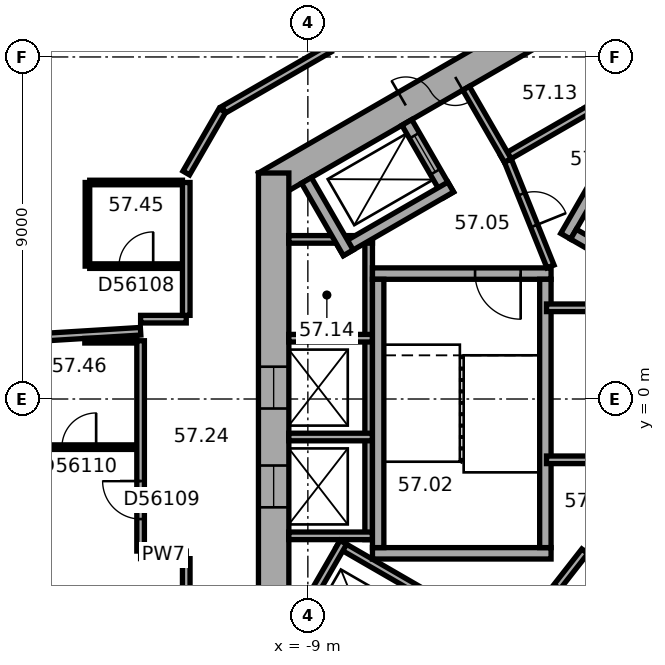
"""IFC4 building model, lengths in metres.
Left out: names, types, materials, properties, quantities, classifications, styles, units other than length and angle.
Written with IfcOpenShell. Run it as: python <this file> out.ifc"""

import sys

from ifc_helpers import new_model, si_unit, direction, frame, frame_2d, origin, place, context, subcontext, project, spatial, rectangle, extrude, element, fill, save


model = new_model("IFC4")
c1 = context("Model", 3, precision=1e-05, world=origin(), true_north=direction((0.0, 1.0)))
c2 = subcontext(c1, "Body", "Model", "MODEL_VIEW")
j1 = project(units=[si_unit("LENGTHUNIT", "METRE"), si_unit("PLANEANGLEUNIT", "RADIAN")], contexts=[c1])
p1 = place(None, origin())
s1 = spatial("IfcSite", under=j1, at=p1, CompositionType="ELEMENT")
p2 = place(p1, origin())
s2 = spatial("IfcBuilding", under=s1, at=p2, CompositionType="ELEMENT")
p3 = place(p2, frame((0.0, 0.0, 232.8)))
s3 = spatial("IfcBuildingStorey", under=s2, at=p3, CompositionType="ELEMENT", Elevation=232.8)
p4 = place(p3, frame((0.2, 11.547, 0.0), z_axis=(0.0, 0.0, 1.0), x_axis=(-0.866023897231, -0.500002609418, 0.0)))
e1 = element("IfcWall", 1, at=p4, inside=s3, PredefinedType="SHEAR", context=c2, shape_type="SweptSolid", body=[
    extrude(rectangle(XDim=11.894, YDim=0.8, at=frame_2d((5.947, 0.0))), origin(), (0.0, 0.0, 1.0), 3.7),
])
p5 = place(p4, frame((6.147, 0.0, 0.0)))
e2 = element("IfcOpeningElement", 2, at=p5, cuts=e1, PredefinedType="OPENING", context=c2, shape_type="SweptSolid", body=[
    extrude(rectangle(XDim=1.5, YDim=2.1, at=frame_2d((0.75, 1.05))), frame((0.0, 0.41, 0.0), z_axis=(0.0, -1.0, 0.0), x_axis=(1.0, 0.0, 0.0)), (0.0, 0.0, 1.0), 0.82),
])
p6 = place(p4, frame((2.997, 0.0, 0.0)))
e3 = element("IfcOpeningElement", 3, at=p6, cuts=e1, PredefinedType="OPENING", context=c2, shape_type="SweptSolid", body=[
    extrude(rectangle(XDim=0.9, YDim=2.1, at=frame_2d((0.45, 1.05))), frame((0.0, 0.41, 0.0), z_axis=(0.0, -1.0, 0.0), x_axis=(1.0, 0.0, 0.0)), (0.0, 0.0, 1.0), 0.82),
])
p7 = place(p3, frame((-9.9, 5.947, 0.0), z_axis=(0.0, 0.0, 1.0), x_axis=(0.0, -1.0, 0.0)))
e4 = element("IfcWall", 4, at=p7, inside=s3, PredefinedType="SHEAR", context=c2, shape_type="SweptSolid", body=[
    extrude(rectangle(XDim=11.894, YDim=0.8, at=frame_2d((5.947, 0.0))), origin(), (0.0, 0.0, 1.0), 3.7),
])
p8 = place(p7, frame((5.097, 0.0, 0.0)))
e5 = element("IfcOpeningElement", 5, at=p8, cuts=e4, PredefinedType="OPENING", context=c2, shape_type="SweptSolid", body=[
    extrude(rectangle(XDim=1.1, YDim=2.1, at=frame_2d((0.55, 1.05))), frame((0.0, 0.41, 0.0), z_axis=(0.0, -1.0, 0.0), x_axis=(1.0, 0.0, 0.0)), (0.0, 0.0, 1.0), 0.82),
])
p9 = place(p7, frame((7.697, 0.0, 0.0)))
e6 = element("IfcOpeningElement", 6, at=p9, cuts=e4, PredefinedType="OPENING", context=c2, shape_type="SweptSolid", body=[
    extrude(rectangle(XDim=1.1, YDim=2.1, at=frame_2d((0.55, 1.05))), frame((0.0, 0.41, 0.0), z_axis=(0.0, -1.0, 0.0), x_axis=(1.0, 0.0, 0.0)), (0.0, 0.0, 1.0), 0.82),
])
p10 = place(p3, frame((0.803, 9.009, 0.0), z_axis=(0.0, 0.0, 1.0), x_axis=(-0.866028230842, -0.499995103361, 0.0)))
e7 = element("IfcWall", 7, at=p10, inside=s3, PredefinedType="PARTITIONING", context=c2, shape_type="SweptSolid", body=[
    extrude(rectangle(XDim=5.4, YDim=0.2, at=frame_2d((2.7, 0.0))), origin(), (0.0, 0.0, 1.0), 3.42),
])
p11 = place(p3, frame((-3.737, 6.272, 0.0), z_axis=(0.0, 0.0, 1.0), x_axis=(-0.50002983664, 0.866008176907, 0.0)))
e8 = element("IfcWall", 8, at=p11, inside=s3, PredefinedType="PARTITIONING", context=c2, shape_type="SweptSolid", body=[
    extrude(rectangle(XDim=2.2, YDim=0.2, at=frame_2d((1.1, 0.0))), origin(), (0.0, 0.0, 1.0), 3.42),
])
p12 = place(p3, frame((-7.4, 4.3, 0.0), z_axis=(0.0, 0.0, 1.0), x_axis=(0.0, -1.0, 0.0)))
e9 = element("IfcWall", 9, at=p12, inside=s3, PredefinedType="PARTITIONING", context=c2, shape_type="SweptSolid", body=[
    extrude(rectangle(XDim=8.0, YDim=0.2, at=frame_2d((4.0, 0.0))), origin(), (0.0, 0.0, 1.0), 3.42),
])
for number, where, z_axis, x_axis in (
    (10, (-7.3, 4.2, 0.0), (0.0, 0.0, 1.0), (-1.0, 0.0, 0.0)),
    (11, (-7.3, 1.6, 0.0), (0.0, 0.0, 1.0), (-1.0, 0.0, 0.0)),
    (12, (-7.3, -1.0, 0.0), (0.0, 0.0, 1.0), (-1.0, 0.0, 0.0)),
    (13, (-7.3, -3.6, 0.0), (0.0, 0.0, 1.0), (-1.0, 0.0, 0.0)),
):
    element("IfcWall", number, at=place(p3, frame(where, z_axis=z_axis, x_axis=x_axis)), inside=s3, PredefinedType="PARTITIONING", context=c2, shape_type="SweptSolid", body=[
        extrude(rectangle(XDim=2.2, YDim=0.2, at=frame_2d((1.1, 0.0))), origin(), (0.0, 0.0, 1.0), 3.42),
    ])
p13 = place(p3, frame((-8.203, -3.809, 0.0), z_axis=(0.0, 0.0, 1.0), x_axis=(0.866028230842, -0.499995103361, 0.0)))
e14 = element("IfcWall", 14, at=p13, inside=s3, PredefinedType="PARTITIONING", context=c2, shape_type="SweptSolid", body=[
    extrude(rectangle(XDim=5.4, YDim=0.2, at=frame_2d((2.7, 0.0))), origin(), (0.0, 0.0, 1.0), 3.42),
])
p14 = place(p3, frame((-8.067, -3.772, 0.0), z_axis=(0.0, 0.0, 1.0), x_axis=(-0.50002983664, -0.866008176907, 0.0)))
e15 = element("IfcWall", 15, at=p14, inside=s3, PredefinedType="PARTITIONING", context=c2, shape_type="SweptSolid", body=[
    extrude(rectangle(XDim=2.2, YDim=0.2, at=frame_2d((1.1, 0.0))), origin(), (0.0, 0.0, 1.0), 3.42),
])
p15 = place(p3, frame((-2.216, 4.282, 0.0), z_axis=(0.0, 0.0, 1.0), x_axis=(0.499977259774, 0.866038532462, 0.0)))
e16 = element("IfcWall", 16, at=p15, inside=s3, PredefinedType="SHEAR", context=c2, shape_type="SweptSolid", body=[
    extrude(rectangle(XDim=4.7, YDim=0.3, at=frame_2d((2.35, 0.0))), origin(), (0.0, 0.0, 1.0), 3.42),
])
p16 = place(p3, frame((4.103, 0.807, 0.0), z_axis=(0.0, 0.0, 1.0), x_axis=(-0.866027801685, 0.499995846692, 0.0)))
e17 = element("IfcWall", 17, at=p16, inside=s3, PredefinedType="SHEAR", context=c2, shape_type="SweptSolid", body=[
    extrude(rectangle(XDim=7.06, YDim=0.3, at=frame_2d((3.53, 0.0))), origin(), (0.0, 0.0, 1.0), 3.42),
])
p17 = place(p3, frame((-2.6, 3.3, 0.0), z_axis=(0.0, 0.0, 1.0), x_axis=(-1.0, 0.0, 0.0)))
e18 = element("IfcWall", 18, at=p17, inside=s3, PredefinedType="SHEAR", context=c2, shape_type="SweptSolid", body=[
    extrude(rectangle(XDim=4.7, YDim=0.3, at=frame_2d((2.35, 0.0))), origin(), (0.0, 0.0, 1.0), 3.42),
])
p18 = place(p17, frame((0.8, 0.0, 0.0)))
e19 = element("IfcOpeningElement", 19, at=p18, cuts=e18, PredefinedType="OPENING", context=c2, shape_type="SweptSolid", body=[
    extrude(rectangle(XDim=1.2, YDim=2.1, at=frame_2d((0.6, 1.05))), frame((0.0, 0.16, 0.0), z_axis=(0.0, -1.0, 0.0), x_axis=(1.0, 0.0, 0.0)), (0.0, 0.0, 1.0), 0.32),
])
p19 = place(p3, frame((-2.6, -4.06, 0.0), z_axis=(0.0, 0.0, 1.0), x_axis=(-1.0, 0.0, 0.0)))
e20 = element("IfcWall", 20, at=p19, inside=s3, PredefinedType="SHEAR", context=c2, shape_type="SweptSolid", body=[
    extrude(rectangle(XDim=4.7, YDim=0.3, at=frame_2d((2.35, 0.0))), origin(), (0.0, 0.0, 1.0), 3.42),
])
for number, where, z_axis, x_axis in (
    (21, (-2.75, 3.15, 0.0), (0.0, 0.0, 1.0), (0.0, -1.0, 0.0)),
    (22, (-7.15, 3.15, 0.0), (0.0, 0.0, 1.0), (0.0, -1.0, 0.0)),
):
    element("IfcWall", number, at=place(p3, frame(where, z_axis=z_axis, x_axis=x_axis)), inside=s3, PredefinedType="SHEAR", context=c2, shape_type="SweptSolid", body=[
        extrude(rectangle(XDim=7.06, YDim=0.3, at=frame_2d((3.53, 0.0))), origin(), (0.0, 0.0, 1.0), 3.42),
    ])
p20 = place(p3, frame((-5.295, 5.372, 0.0), z_axis=(0.0, 0.0, 1.0), x_axis=(-0.500077893725, 0.86598042715, 0.0)))
e23 = element("IfcWall", 23, at=p20, inside=s3, PredefinedType="SHEAR", context=c2, shape_type="SweptSolid", body=[
    extrude(rectangle(XDim=2.2, YDim=0.3, at=frame_2d((1.1, 0.0))), origin(), (0.0, 0.0, 1.0), 3.42),
])
p21 = place(p20, frame((0.7, 0.0, 0.0)))
e24 = element("IfcOpeningElement", 24, at=p21, cuts=e23, PredefinedType="OPENING", context=c2, shape_type="SweptSolid", body=[
    extrude(rectangle(XDim=1.1, YDim=2.1, at=frame_2d((0.55, 1.05))), frame((0.0, 0.16, 0.0), z_axis=(0.0, -1.0, 0.0), x_axis=(1.0, 0.0, 0.0)), (0.0, 0.0, 1.0), 0.32),
])
p22 = place(p3, frame((-5.24, 5.577, 0.0), z_axis=(0.0, 0.0, 1.0), x_axis=(-0.866014461049, -0.500018952895, 0.0)))
e25 = element("IfcWall", 25, at=p22, inside=s3, PredefinedType="SHEAR", context=c2, shape_type="SweptSolid", body=[
    extrude(rectangle(XDim=3.35, YDim=0.3, at=frame_2d((1.675, 0.0))), origin(), (0.0, 0.0, 1.0), 3.42),
])
p23 = place(p3, frame((-7.937, 3.847, 0.0), z_axis=(0.0, 0.0, 1.0), x_axis=(-0.50002983664, 0.866008176907, 0.0)))
e26 = element("IfcWall", 26, at=p23, inside=s3, PredefinedType="SHEAR", context=c2, shape_type="SweptSolid", body=[
    extrude(rectangle(XDim=2.2, YDim=0.3, at=frame_2d((1.1, 0.0))), origin(), (0.0, 0.0, 1.0), 3.42),
])
p24 = place(p3, frame((-2.615, 3.487, 0.0), z_axis=(0.0, 0.0, 1.0), x_axis=(-0.373576831041, 0.92759924068, 0.0)))
e27 = element("IfcWall", 27, at=p24, inside=s3, PredefinedType="PARTITIONING", context=c2, shape_type="SweptSolid", body=[
    extrude(rectangle(XDim=3.002, YDim=0.2, at=frame_2d((1.501, 0.0))), origin(), (0.0, 0.0, 1.0), 3.42),
])
p25 = place(p24, frame((1.15, 0.0, 0.0)))
e28 = element("IfcOpeningElement", 28, at=p25, cuts=e27, PredefinedType="OPENING", context=c2, shape_type="SweptSolid", body=[
    extrude(rectangle(XDim=0.9, YDim=2.1, at=frame_2d((0.45, 1.05))), frame((0.0, 0.11, 0.0), z_axis=(0.0, -1.0, 0.0), x_axis=(1.0, 0.0, 0.0)), (0.0, 0.0, 1.0), 0.22),
])
p26 = place(p3, frame((-1.712, -4.008, 0.0), z_axis=(0.0, 0.0, 1.0), x_axis=(-0.616549420702, -0.787316208287, 0.0)))
e29 = element("IfcWall", 29, at=p26, inside=s3, PredefinedType="PARTITIONING", context=c2, shape_type="SweptSolid", body=[
    extrude(rectangle(XDim=3.002, YDim=0.2, at=frame_2d((1.501, 0.0))), origin(), (0.0, 0.0, 1.0), 3.42),
])
p27 = place(p26, frame((1.15, 0.0, 0.0)))
e30 = element("IfcOpeningElement", 30, at=p27, cuts=e29, PredefinedType="OPENING", context=c2, shape_type="SweptSolid", body=[
    extrude(rectangle(XDim=0.9, YDim=2.1, at=frame_2d((0.45, 1.05))), frame((0.0, 0.11, 0.0), z_axis=(0.0, -1.0, 0.0), x_axis=(1.0, 0.0, 0.0)), (0.0, 0.0, 1.0), 0.22),
])
p28 = place(p3, frame((-2.72, -1.6, 0.0), z_axis=(0.0, 0.0, 1.0), x_axis=(1.0, 0.0, 0.0)))
e31 = element("IfcWall", 31, at=p28, inside=s3, PredefinedType="PARTITIONING", context=c2, shape_type="SweptSolid", body=[
    extrude(rectangle(XDim=5.269, YDim=0.2, at=frame_2d((2.634, 0.0))), origin(), (0.0, 0.0, 1.0), 3.42),
])
p29 = place(p3, frame((-2.72, 2.4, 0.0), z_axis=(0.0, 0.0, 1.0), x_axis=(1.0, 0.0, 0.0)))
e32 = element("IfcWall", 32, at=p29, inside=s3, PredefinedType="PARTITIONING", context=c2, shape_type="SweptSolid", body=[
    extrude(rectangle(XDim=3.883, YDim=0.2, at=frame_2d((1.941, 0.0))), origin(), (0.0, 0.0, 1.0), 3.42),
])
p30 = place(p3, frame((-19.672, 1.4, 0.0), z_axis=(0.0, 0.0, 1.0), x_axis=(0.99813499784, 0.061045278997, 0.0)))
e33 = element("IfcWall", 33, at=p30, inside=s3, PredefinedType="PARTITIONING", context=c2, shape_type="SweptSolid", body=[
    extrude(rectangle(XDim=6.283, YDim=0.2, at=frame_2d((3.142, 0.0))), origin(), (0.0, 0.0, 1.0), 2.87),
])
p31 = place(p3, frame((-14.869, 1.533, 0.0), z_axis=(0.0, 0.0, 1.0), x_axis=(1.0, 0.0, 0.0)))
e34 = element("IfcWall", 34, at=p31, inside=s3, PredefinedType="PARTITIONING", context=c2, shape_type="SweptSolid", body=[
    extrude(rectangle(XDim=1.368, YDim=0.12, at=frame_2d((0.684, 0.0))), origin(), (0.0, 0.0, 1.0), 3.42),
])
p32 = place(p3, frame((-14.8, 3.497, 0.0), z_axis=(0.0, 0.0, 1.0), x_axis=(0.0, 1.0, 0.0)))
e35 = element("IfcWall", 35, at=p32, inside=s3, PredefinedType="PARTITIONING", context=c2, shape_type="SweptSolid", body=[
    extrude(rectangle(XDim=2.2, YDim=0.12, at=frame_2d((1.1, 0.0))), origin(), (0.0, 0.0, 1.0), 3.42),
])
p33 = place(p3, frame((-14.74, 5.697, 0.0), z_axis=(0.0, 0.0, 1.0), x_axis=(1.0, 0.0, 0.0)))
e36 = element("IfcWall", 36, at=p33, inside=s3, PredefinedType="PARTITIONING", context=c2, shape_type="SweptSolid", body=[
    extrude(rectangle(XDim=2.44, YDim=0.12, at=frame_2d((1.22, 0.0))), origin(), (0.0, 0.0, 1.0), 3.42),
])
p34 = place(p3, frame((-13.501, -1.267, 0.0), z_axis=(0.0, 0.0, 1.0), x_axis=(-1.0, 0.0, 0.0)))
e37 = element("IfcWall", 37, at=p34, inside=s3, PredefinedType="PARTITIONING", context=c2, shape_type="SweptSolid", body=[
    extrude(rectangle(XDim=3.04, YDim=0.12, at=frame_2d((1.52, 0.0))), origin(), (0.0, 0.0, 1.0), 3.42),
])
p35 = place(p34, frame((1.07, 0.0, 0.0)))
e38 = element("IfcOpeningElement", 38, at=p35, cuts=e37, PredefinedType="OPENING", context=c2, shape_type="SweptSolid", body=[
    extrude(rectangle(XDim=0.9, YDim=2.1, at=frame_2d((0.45, 1.05))), frame((0.0, 0.07, 0.0), z_axis=(0.0, -1.0, 0.0), x_axis=(1.0, 0.0, 0.0)), (0.0, 0.0, 1.0), 0.14),
])
p36 = place(p3, frame((-13.401, -4.101, 0.0), z_axis=(0.0, 0.0, 1.0), x_axis=(1.0, 0.0, 0.0)))
e39 = element("IfcWall", 39, at=p36, inside=s3, PredefinedType="PARTITIONING", context=c2, shape_type="SweptSolid", body=[
    extrude(rectangle(XDim=1.201, YDim=0.2, at=frame_2d((0.601, 0.0))), origin(), (0.0, 0.0, 1.0), 3.42),
])
p37 = place(p3, frame((-13.401, 1.533, 0.0), z_axis=(0.0, 0.0, 1.0), x_axis=(0.0, -1.0, 0.0)))
e40 = element("IfcWall", 40, at=p37, inside=s3, PredefinedType="PARTITIONING", context=c2, shape_type="SweptSolid", body=[
    extrude(rectangle(XDim=5.534, YDim=0.2, at=frame_2d((2.767, 0.0))), origin(), (0.0, 0.0, 1.0), 3.42),
])
p38 = place(p37, frame((3.692, 0.0, 0.0)))
e41 = element("IfcOpeningElement", 41, at=p38, cuts=e40, PredefinedType="OPENING", context=c2, shape_type="SweptSolid", body=[
    extrude(rectangle(XDim=1.0, YDim=2.1, at=frame_2d((0.5, 1.05))), frame((0.0, 0.11, 0.0), z_axis=(0.0, -1.0, 0.0), x_axis=(1.0, 0.0, 0.0)), (0.0, 0.0, 1.0), 0.22),
])
p39 = place(p3, frame((-12.3, 3.497, 0.0), z_axis=(0.0, 0.0, 1.0), x_axis=(-1.0, 0.0, 0.0)))
e42 = element("IfcWall", 42, at=p39, inside=s3, PredefinedType="PARTITIONING", context=c2, shape_type="SweptSolid", body=[
    extrude(rectangle(XDim=2.44, YDim=0.12, at=frame_2d((1.22, 0.0))), origin(), (0.0, 0.0, 1.0), 3.42),
])
p40 = place(p39, frame((0.77, 0.0, 0.0)))
e43 = element("IfcOpeningElement", 43, at=p40, cuts=e42, PredefinedType="OPENING", context=c2, shape_type="SweptSolid", body=[
    extrude(rectangle(XDim=0.9, YDim=2.1, at=frame_2d((0.45, 1.05))), frame((0.0, 0.07, 0.0), z_axis=(0.0, -1.0, 0.0), x_axis=(1.0, 0.0, 0.0)), (0.0, 0.0, 1.0), 0.14),
])
p41 = place(p3, frame((-12.2, -4.201, 0.0), z_axis=(0.0, 0.0, 1.0), x_axis=(0.0, -1.0, 0.0)))
e44 = element("IfcWall", 44, at=p41, inside=s3, PredefinedType="PARTITIONING", context=c2, shape_type="SweptSolid", body=[
    extrude(rectangle(XDim=1.706, YDim=0.2, at=frame_2d((0.853, 0.0))), origin(), (0.0, 0.0, 1.0), 3.42),
])
p42 = place(p3, frame((-12.2, 2.101, 0.0), z_axis=(0.0, 0.0, 1.0), x_axis=(-1.0, 0.0, 0.0)))
e45 = element("IfcWall", 45, at=p42, inside=s3, PredefinedType="PARTITIONING", context=c2, shape_type="SweptSolid", body=[
    extrude(rectangle(XDim=1.201, YDim=0.2, at=frame_2d((0.601, 0.0))), origin(), (0.0, 0.0, 1.0), 3.42),
])
p43 = place(p3, frame((-12.2, 5.697, 0.0), z_axis=(0.0, 0.0, 1.0), x_axis=(0.0, -1.0, 0.0)))
e46 = element("IfcWall", 46, at=p43, inside=s3, PredefinedType="PARTITIONING", context=c2, shape_type="SweptSolid", body=[
    extrude(rectangle(XDim=3.496, YDim=0.2, at=frame_2d((1.748, 0.0))), origin(), (0.0, 0.0, 1.0), 3.42),
])
p44 = place(p3, frame((-11.25, 7.592, 0.0), z_axis=(0.0, 0.0, 1.0), x_axis=(-0.500022797313, -0.86601224135, 0.0)))
e47 = element("IfcWall", 47, at=p44, inside=s3, PredefinedType="PARTITIONING", context=c2, shape_type="SweptSolid", body=[
    extrude(rectangle(XDim=1.9, YDim=0.2, at=frame_2d((0.95, 0.0))), origin(), (0.0, 0.0, 1.0), 3.42),
])
p45 = place(p3, frame((-8.437, 9.217, 0.0), z_axis=(0.0, 0.0, 1.0), x_axis=(-0.866005660673, -0.500034194513, 0.0)))
e48 = element("IfcWall", 48, at=p45, inside=s3, PredefinedType="PARTITIONING", context=c2, shape_type="SweptSolid", body=[
    extrude(rectangle(XDim=3.209, YDim=0.2, at=frame_2d((1.604, 0.0))), origin(), (0.0, 0.0, 1.0), 3.42),
])
p46 = place(p5, origin())
e49 = element("IfcDoor", 49, at=p46, inside=s3, OperationType="DOUBLE_DOOR_SINGLE_SWING", PredefinedType="DOOR", context=c2, shape_type="SweptSolid", body=[
    extrude(rectangle(XDim=1.5, YDim=2.1, at=frame_2d((0.75, 1.05))), frame((0.0, 0.025, 0.0), z_axis=(0.0, -1.0, 0.0), x_axis=(1.0, 0.0, 0.0)), (0.0, 0.0, 1.0), 0.05),
])
fill(e2, e49)
p47 = place(p18, origin())
e50 = element("IfcDoor", 50, at=p47, inside=s3, OperationType="SINGLE_SWING_RIGHT", PredefinedType="DOOR", context=c2, shape_type="SweptSolid", body=[
    extrude(rectangle(XDim=1.2, YDim=2.1, at=frame_2d((0.6, 1.05))), frame((0.0, 0.025, 0.0), z_axis=(0.0, -1.0, 0.0), x_axis=(1.0, 0.0, 0.0)), (0.0, 0.0, 1.0), 0.05),
])
fill(e19, e50)
p48 = place(p25, origin())
e51 = element("IfcDoor", 51, at=p48, inside=s3, OperationType="SINGLE_SWING_LEFT", PredefinedType="DOOR", context=c2, shape_type="SweptSolid", body=[
    extrude(rectangle(XDim=0.9, YDim=2.1, at=frame_2d((0.45, 1.05))), frame((0.0, 0.025, 0.0), z_axis=(0.0, -1.0, 0.0), x_axis=(1.0, 0.0, 0.0)), (0.0, 0.0, 1.0), 0.05),
])
fill(e28, e51)
p49 = place(p27, origin())
e52 = element("IfcDoor", 52, at=p49, inside=s3, OperationType="SINGLE_SWING_LEFT", PredefinedType="DOOR", context=c2, shape_type="SweptSolid", body=[
    extrude(rectangle(XDim=0.9, YDim=2.1, at=frame_2d((0.45, 1.05))), frame((0.0, 0.025, 0.0), z_axis=(0.0, -1.0, 0.0), x_axis=(1.0, 0.0, 0.0)), (0.0, 0.0, 1.0), 0.05),
])
fill(e30, e52)
p50 = place(p21, origin())
e53 = element("IfcDoor", 53, at=p50, inside=s3, OperationType="DOUBLE_DOOR_SLIDING", PredefinedType="DOOR", context=c2, shape_type="SweptSolid", body=[
    extrude(rectangle(XDim=1.1, YDim=2.1, at=frame_2d((0.55, 1.05))), frame((0.0, 0.025, 0.0), z_axis=(0.0, -1.0, 0.0), x_axis=(1.0, 0.0, 0.0)), (0.0, 0.0, 1.0), 0.05),
])
fill(e24, e53)
p51 = place(p8, origin())
e54 = element("IfcDoor", 54, at=p51, inside=s3, OperationType="DOUBLE_DOOR_SLIDING", PredefinedType="DOOR", context=c2, shape_type="SweptSolid", body=[
    extrude(rectangle(XDim=1.1, YDim=2.1, at=frame_2d((0.55, 1.05))), frame((0.0, 0.025, 0.0), z_axis=(0.0, -1.0, 0.0), x_axis=(1.0, 0.0, 0.0)), (0.0, 0.0, 1.0), 0.05),
])
fill(e5, e54)
p52 = place(p9, origin())
e55 = element("IfcDoor", 55, at=p52, inside=s3, OperationType="DOUBLE_DOOR_SLIDING", PredefinedType="DOOR", context=c2, shape_type="SweptSolid", body=[
    extrude(rectangle(XDim=1.1, YDim=2.1, at=frame_2d((0.55, 1.05))), frame((0.0, 0.025, 0.0), z_axis=(0.0, -1.0, 0.0), x_axis=(1.0, 0.0, 0.0)), (0.0, 0.0, 1.0), 0.05),
])
fill(e6, e55)
p53 = place(p40, origin())
e56 = element("IfcDoor", 56, at=p53, inside=s3, OperationType="SINGLE_SWING_LEFT", PredefinedType="DOOR", context=c2, shape_type="SweptSolid", body=[
    extrude(rectangle(XDim=0.9, YDim=2.1, at=frame_2d((0.45, 1.05))), frame((0.0, 0.025, 0.0), z_axis=(0.0, -1.0, 0.0), x_axis=(1.0, 0.0, 0.0)), (0.0, 0.0, 1.0), 0.05),
])
fill(e43, e56)
p54 = place(p38, origin())
e57 = element("IfcDoor", 57, at=p54, inside=s3, OperationType="SINGLE_SWING_LEFT", PredefinedType="DOOR", context=c2, shape_type="SweptSolid", body=[
    extrude(rectangle(XDim=1.0, YDim=2.1, at=frame_2d((0.5, 1.05))), frame((0.0, 0.025, 0.0), z_axis=(0.0, -1.0, 0.0), x_axis=(1.0, 0.0, 0.0)), (0.0, 0.0, 1.0), 0.05),
])
fill(e41, e57)
p55 = place(p35, origin())
e58 = element("IfcDoor", 58, at=p55, inside=s3, OperationType="SINGLE_SWING_LEFT", PredefinedType="DOOR", context=c2, shape_type="SweptSolid", body=[
    extrude(rectangle(XDim=0.9, YDim=2.1, at=frame_2d((0.45, 1.05))), frame((0.0, 0.025, 0.0), z_axis=(0.0, -1.0, 0.0), x_axis=(1.0, 0.0, 0.0)), (0.0, 0.0, 1.0), 0.05),
])
fill(e38, e58)
save(model, sys.argv[1])
